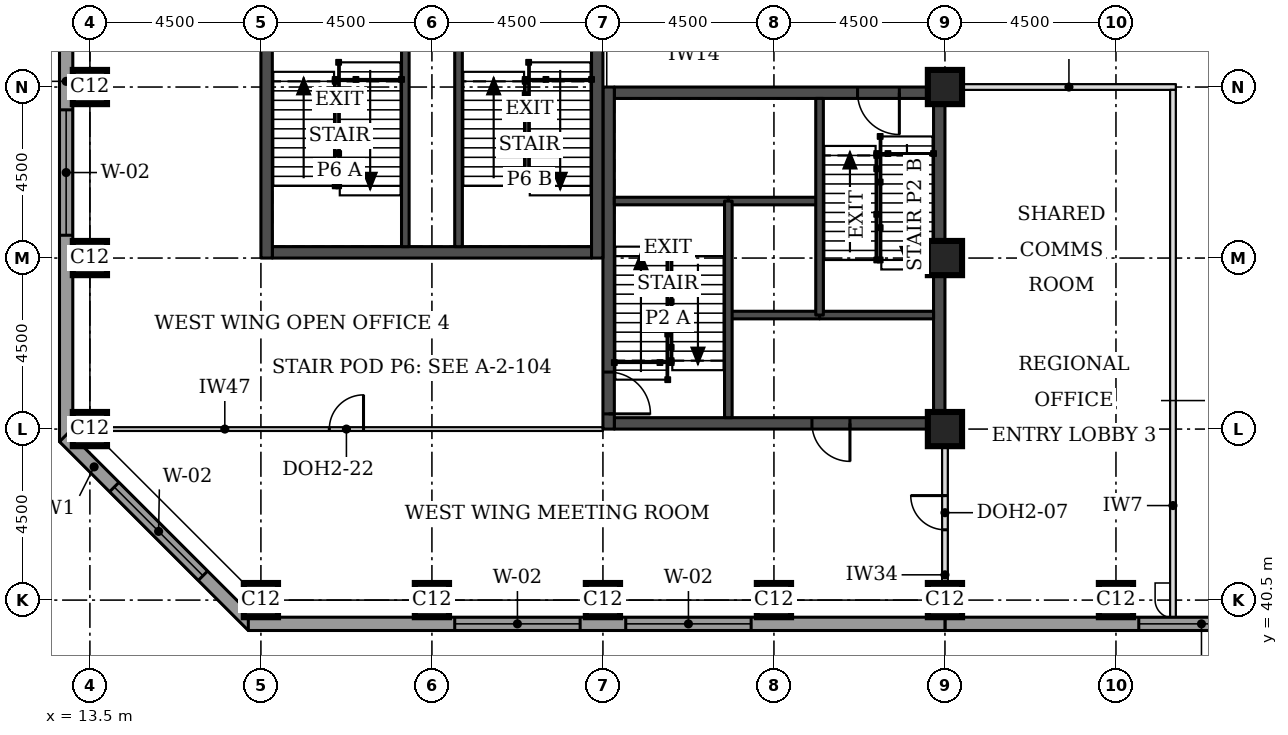
"""IFC4 building model, lengths in metres.
Left out: names, types, materials, properties, quantities, classifications, styles, units other than length and angle.
Written with IfcOpenShell. Run it as: python <this file> out.ifc"""

import sys

from ifc_helpers import new_model, si_unit, direction, frame, frame_2d, origin, origin_2d, place, context, subcontext, project, spatial, rectangle, extrude, element, fill, save


model = new_model("IFC4")
c1 = context("Model", 3, precision=1e-05, world=origin(), true_north=direction((0.0, 1.0)))
c2 = subcontext(c1, "Body", "Model", "MODEL_VIEW")
j1 = project(units=[si_unit("LENGTHUNIT", "METRE"), si_unit("PLANEANGLEUNIT", "RADIAN")], contexts=[c1])
p1 = place(None, origin())
s1 = spatial("IfcSite", under=j1, at=p1, CompositionType="ELEMENT")
p2 = place(p1, origin())
s2 = spatial("IfcBuilding", under=s1, at=p2, CompositionType="ELEMENT")
p3 = place(p2, frame((0.0, 0.0, 155.1)))
s3 = spatial("IfcBuildingStorey", under=s2, at=p3, CompositionType="ELEMENT", Elevation=155.1)
for number, where, z_axis, x_axis in (
    (1, (18.0, 40.5, 0.0), (0.0, 0.0, 1.0), (1.0, 0.0, 0.0)),
    (2, (22.5, 40.5, 0.0), (0.0, 0.0, 1.0), (1.0, 0.0, 0.0)),
    (3, (27.0, 40.5, 0.0), (0.0, 0.0, 1.0), (1.0, 0.0, 0.0)),
    (4, (31.5, 40.5, 0.0), (0.0, 0.0, 1.0), (1.0, 0.0, 0.0)),
    (5, (36.0, 40.5, 0.0), (0.0, 0.0, 1.0), (1.0, 0.0, 0.0)),
    (6, (40.5, 40.5, 0.0), (0.0, 0.0, 1.0), (1.0, 0.0, 0.0)),
    (7, (13.5, 45.0, 0.0), (0.0, 0.0, 1.0), (1.0, 0.0, 0.0)),
    (8, (36.0, 45.0, 0.0), (0.0, 0.0, 1.0), (1.0, 0.0, 0.0)),
    (9, (13.5, 49.5, 0.0), (0.0, 0.0, 1.0), (1.0, 0.0, 0.0)),
    (10, (36.0, 49.5, 0.0), (0.0, 0.0, 1.0), (1.0, 0.0, 0.0)),
    (11, (13.5, 54.0, 0.0), (0.0, 0.0, 1.0), (1.0, 0.0, 0.0)),
    (12, (36.0, 54.0, 0.0), (0.0, 0.0, 1.0), (1.0, 0.0, 0.0)),
):
    element("IfcColumn", number, at=place(p3, frame(where, z_axis=z_axis, x_axis=x_axis)), inside=s3, PredefinedType="COLUMN", context=c2, shape_type="SweptSolid", body=[
        extrude(rectangle(XDim=0.9, YDim=0.9, at=origin_2d()), origin(), (0.0, 0.0, 1.0), 3.7),
    ])
p4 = place(p3, frame((27.3, 45.15, 0.0), z_axis=(0.0, 0.0, 1.0), x_axis=(1.0, 0.0, 0.0)))
e13 = element("IfcWall", 13, at=p4, inside=s3, PredefinedType="SHEAR", context=c2, shape_type="SweptSolid", body=[
    extrude(rectangle(XDim=8.4, YDim=0.3, at=frame_2d((4.2, 0.0))), origin(), (0.0, 0.0, 1.0), 3.7),
])
p5 = place(p4, frame((5.2, 0.0, 0.0)))
e14 = element("IfcOpeningElement", 14, at=p5, cuts=e13, PredefinedType="OPENING", context=c2, shape_type="SweptSolid", body=[
    extrude(rectangle(XDim=1.0, YDim=2.1, at=frame_2d((0.5, 1.05))), frame((0.0, 0.16, 0.0), z_axis=(0.0, -1.0, 0.0), x_axis=(1.0, 0.0, 0.0)), (0.0, 0.0, 1.0), 0.32),
])
p6 = place(p3, frame((27.3, 53.85, 0.0), z_axis=(0.0, 0.0, 1.0), x_axis=(1.0, 0.0, 0.0)))
e15 = element("IfcWall", 15, at=p6, inside=s3, PredefinedType="SHEAR", context=c2, shape_type="SweptSolid", body=[
    extrude(rectangle(XDim=8.4, YDim=0.3, at=frame_2d((4.2, 0.0))), origin(), (0.0, 0.0, 1.0), 3.7),
])
p7 = place(p6, frame((6.4, 0.0, 0.0)))
e16 = element("IfcOpeningElement", 16, at=p7, cuts=e15, PredefinedType="OPENING", context=c2, shape_type="SweptSolid", body=[
    extrude(rectangle(XDim=1.1, YDim=2.1, at=frame_2d((0.55, 1.05))), frame((0.0, 0.16, 0.0), z_axis=(0.0, -1.0, 0.0), x_axis=(1.0, 0.0, 0.0)), (0.0, 0.0, 1.0), 0.32),
])
p8 = place(p3, frame((27.15, 45.0, 0.0), z_axis=(0.0, 0.0, 1.0), x_axis=(0.0, 1.0, 0.0)))
e17 = element("IfcWall", 17, at=p8, inside=s3, PredefinedType="SHEAR", context=c2, shape_type="SweptSolid", body=[
    extrude(rectangle(XDim=9.0, YDim=0.3, at=frame_2d((4.5, 0.0))), origin(), (0.0, 0.0, 1.0), 3.7),
])
p9 = place(p8, frame((0.4, 0.0, 0.0)))
e18 = element("IfcOpeningElement", 18, at=p9, cuts=e17, PredefinedType="OPENING", context=c2, shape_type="SweptSolid", body=[
    extrude(rectangle(XDim=1.1, YDim=2.1, at=frame_2d((0.55, 1.05))), frame((0.0, 0.16, 0.0), z_axis=(0.0, -1.0, 0.0), x_axis=(1.0, 0.0, 0.0)), (0.0, 0.0, 1.0), 0.32),
])
p10 = place(p3, frame((35.85, 45.0, 0.0), z_axis=(0.0, 0.0, 1.0), x_axis=(0.0, 1.0, 0.0)))
e19 = element("IfcWall", 19, at=p10, inside=s3, PredefinedType="SHEAR", context=c2, shape_type="SweptSolid", body=[
    extrude(rectangle(XDim=9.0, YDim=0.3, at=frame_2d((4.5, 0.0))), origin(), (0.0, 0.0, 1.0), 3.7),
])
p11 = place(p3, frame((18.3, 49.65, 0.0), z_axis=(0.0, 0.0, 1.0), x_axis=(1.0, 0.0, 0.0)))
e20 = element("IfcWall", 20, at=p11, inside=s3, PredefinedType="SHEAR", context=c2, shape_type="SweptSolid", body=[
    extrude(rectangle(XDim=8.4, YDim=0.3, at=frame_2d((4.2, 0.0))), origin(), (0.0, 0.0, 1.0), 3.7),
])
p12 = place(p3, frame((18.15, 49.5, 0.0), z_axis=(0.0, 0.0, 1.0), x_axis=(0.0, 1.0, 0.0)))
e21 = element("IfcWall", 21, at=p12, inside=s3, PredefinedType="SHEAR", context=c2, shape_type="SweptSolid", body=[
    extrude(rectangle(XDim=9.0, YDim=0.3, at=frame_2d((4.5, 0.0))), origin(), (0.0, 0.0, 1.0), 3.7),
])
p13 = place(p3, frame((26.85, 49.5, 0.0), z_axis=(0.0, 0.0, 1.0), x_axis=(0.0, 1.0, 0.0)))
e22 = element("IfcWall", 22, at=p13, inside=s3, PredefinedType="SHEAR", context=c2, shape_type="SweptSolid", body=[
    extrude(rectangle(XDim=9.0, YDim=0.3, at=frame_2d((4.5, 0.0))), origin(), (0.0, 0.0, 1.0), 3.7),
])
p14 = place(p13, frame((6.6, 0.0, 0.0)))
e23 = element("IfcOpeningElement", 23, at=p14, cuts=e22, PredefinedType="OPENING", context=c2, shape_type="SweptSolid", body=[
    extrude(rectangle(XDim=1.8, YDim=2.1, at=frame_2d((0.9, 1.05))), frame((0.0, 0.16, 0.0), z_axis=(0.0, -1.0, 0.0), x_axis=(1.0, 0.0, 0.0)), (0.0, 0.0, 1.0), 0.32),
])
p15 = place(p3, frame((36.0, 39.875, 0.0), z_axis=(0.0, 0.0, 1.0), x_axis=(1.0, 0.0, 0.0)))
e24 = element("IfcWall", 24, at=p15, inside=s3, PredefinedType="STANDARD", context=c2, shape_type="SweptSolid", body=[
    extrude(rectangle(XDim=36.331, YDim=0.35, at=frame_2d((18.166, 0.0))), origin(), (0.0, 0.0, 1.0), 3.525),
])
p16 = place(p15, frame((5.1, 0.0, 0.9)))
e25 = element("IfcOpeningElement", 25, at=p16, cuts=e24, PredefinedType="OPENING", context=c2, shape_type="SweptSolid", body=[
    extrude(rectangle(XDim=3.3, YDim=1.9, at=frame_2d((1.65, 0.95))), frame((0.0, 0.185, 0.0), z_axis=(0.0, -1.0, 0.0), x_axis=(1.0, 0.0, 0.0)), (0.0, 0.0, 1.0), 0.37),
])
p17 = place(p15, frame((9.6, 0.0, 0.9)))
e26 = element("IfcOpeningElement", 26, at=p17, cuts=e24, PredefinedType="OPENING", context=c2, shape_type="SweptSolid", body=[
    extrude(rectangle(XDim=3.3, YDim=1.9, at=frame_2d((1.65, 0.95))), frame((0.0, 0.185, 0.0), z_axis=(0.0, -1.0, 0.0), x_axis=(1.0, 0.0, 0.0)), (0.0, 0.0, 1.0), 0.37),
])
p18 = place(p15, frame((14.1, 0.0, 0.9)))
e27 = element("IfcOpeningElement", 27, at=p18, cuts=e24, PredefinedType="OPENING", context=c2, shape_type="SweptSolid", body=[
    extrude(rectangle(XDim=3.3, YDim=1.9, at=frame_2d((1.65, 0.95))), frame((0.0, 0.185, 0.0), z_axis=(0.0, -1.0, 0.0), x_axis=(1.0, 0.0, 0.0)), (0.0, 0.0, 1.0), 0.37),
])
p19 = place(p15, frame((18.6, 0.0, 0.9)))
e28 = element("IfcOpeningElement", 28, at=p19, cuts=e24, PredefinedType="OPENING", context=c2, shape_type="SweptSolid", body=[
    extrude(rectangle(XDim=3.3, YDim=1.9, at=frame_2d((1.65, 0.95))), frame((0.0, 0.185, 0.0), z_axis=(0.0, -1.0, 0.0), x_axis=(1.0, 0.0, 0.0)), (0.0, 0.0, 1.0), 0.37),
])
p20 = place(p15, frame((23.1, 0.0, 0.9)))
e29 = element("IfcOpeningElement", 29, at=p20, cuts=e24, PredefinedType="OPENING", context=c2, shape_type="SweptSolid", body=[
    extrude(rectangle(XDim=3.3, YDim=1.9, at=frame_2d((1.65, 0.95))), frame((0.0, 0.185, 0.0), z_axis=(0.0, -1.0, 0.0), x_axis=(1.0, 0.0, 0.0)), (0.0, 0.0, 1.0), 0.37),
])
p21 = place(p15, frame((27.6, 0.0, 0.9)))
e30 = element("IfcOpeningElement", 30, at=p21, cuts=e24, PredefinedType="OPENING", context=c2, shape_type="SweptSolid", body=[
    extrude(rectangle(XDim=3.3, YDim=1.9, at=frame_2d((1.65, 0.95))), frame((0.0, 0.185, 0.0), z_axis=(0.0, -1.0, 0.0), x_axis=(1.0, 0.0, 0.0)), (0.0, 0.0, 1.0), 0.37),
])
p22 = place(p3, frame((12.875, 58.831, 0.0), z_axis=(0.0, 0.0, 1.0), x_axis=(0.0, -1.0, 0.0)))
e31 = element("IfcWall", 31, at=p22, inside=s3, PredefinedType="STANDARD", context=c2, shape_type="SweptSolid", body=[
    extrude(rectangle(XDim=14.163, YDim=0.35, at=frame_2d((7.081, 0.0))), origin(), (0.0, 0.0, 1.0), 3.525),
])
p23 = place(p22, frame((5.431, 0.0, 0.9)))
e32 = element("IfcOpeningElement", 32, at=p23, cuts=e31, PredefinedType="OPENING", context=c2, shape_type="SweptSolid", body=[
    extrude(rectangle(XDim=3.3, YDim=1.9, at=frame_2d((1.65, 0.95))), frame((0.0, 0.185, 0.0), z_axis=(0.0, -1.0, 0.0), x_axis=(1.0, 0.0, 0.0)), (0.0, 0.0, 1.0), 0.37),
])
p24 = place(p3, frame((12.824, 44.792, 0.0), z_axis=(0.0, 0.0, 1.0), x_axis=(0.707106781187, -0.707106781187, 0.0)))
e33 = element("IfcWall", 33, at=p24, inside=s3, PredefinedType="STANDARD", context=c2, shape_type="SweptSolid", body=[
    extrude(rectangle(XDim=7.027, YDim=0.35, at=frame_2d((3.513, 0.0))), origin(), (0.0, 0.0, 1.0), 3.525),
])
p25 = place(p24, frame((1.863, 0.0, 0.9)))
e34 = element("IfcOpeningElement", 34, at=p25, cuts=e33, PredefinedType="OPENING", context=c2, shape_type="SweptSolid", body=[
    extrude(rectangle(XDim=3.3, YDim=1.9, at=frame_2d((1.65, 0.95))), frame((0.0, 0.185, 0.0), z_axis=(0.0, -1.0, 0.0), x_axis=(1.0, 0.0, 0.0)), (0.0, 0.0, 1.0), 0.37),
])
p26 = place(p3, frame((17.669, 39.875, 0.0), z_axis=(0.0, 0.0, 1.0), x_axis=(1.0, 0.0, 0.0)))
e35 = element("IfcWall", 35, at=p26, inside=s3, PredefinedType="STANDARD", context=c2, shape_type="SweptSolid", body=[
    extrude(rectangle(XDim=18.331, YDim=0.35, at=frame_2d((9.166, 0.0))), origin(), (0.0, 0.0, 1.0), 3.525),
])
p27 = place(p26, frame((5.431, 0.0, 0.9)))
e36 = element("IfcOpeningElement", 36, at=p27, cuts=e35, PredefinedType="OPENING", context=c2, shape_type="SweptSolid", body=[
    extrude(rectangle(XDim=3.3, YDim=1.9, at=frame_2d((1.65, 0.95))), frame((0.0, 0.185, 0.0), z_axis=(0.0, -1.0, 0.0), x_axis=(1.0, 0.0, 0.0)), (0.0, 0.0, 1.0), 0.37),
])
p28 = place(p26, frame((9.931, 0.0, 0.9)))
e37 = element("IfcOpeningElement", 37, at=p28, cuts=e35, PredefinedType="OPENING", context=c2, shape_type="SweptSolid", body=[
    extrude(rectangle(XDim=3.3, YDim=1.9, at=frame_2d((1.65, 0.95))), frame((0.0, 0.185, 0.0), z_axis=(0.0, -1.0, 0.0), x_axis=(1.0, 0.0, 0.0)), (0.0, 0.0, 1.0), 0.37),
])
p29 = place(p3, frame((36.45, 54.0, 0.0), z_axis=(0.0, 0.0, 1.0), x_axis=(1.0, 0.0, 0.0)))
e38 = element("IfcWall", 38, at=p29, inside=s3, PredefinedType="PARTITIONING", context=c2, shape_type="SweptSolid", body=[
    extrude(rectangle(XDim=5.625, YDim=0.15, at=frame_2d((2.812, 0.0))), origin(), (0.0, 0.0, 1.0), 3.55),
])
p30 = place(p3, frame((42.0, 40.05, 0.0), z_axis=(0.0, 0.0, 1.0), x_axis=(0.0, 1.0, 0.0)))
e39 = element("IfcWall", 39, at=p30, inside=s3, PredefinedType="PARTITIONING", context=c2, shape_type="SweptSolid", body=[
    extrude(rectangle(XDim=13.875, YDim=0.15, at=frame_2d((6.938, 0.0))), origin(), (0.0, 0.0, 1.0), 3.55),
])
p31 = place(p3, frame((36.0, 40.95, 0.0), z_axis=(0.0, 0.0, 1.0), x_axis=(0.0, 1.0, 0.0)))
e40 = element("IfcWall", 40, at=p31, inside=s3, PredefinedType="PARTITIONING", context=c2, shape_type="SweptSolid", body=[
    extrude(rectangle(XDim=3.63, YDim=0.15, at=frame_2d((1.815, 0.0))), origin(), (0.0, 0.0, 1.0), 2.8),
])
p32 = place(p31, frame((1.4, 0.0, 0.0)))
e41 = element("IfcOpeningElement", 41, at=p32, cuts=e40, PredefinedType="OPENING", context=c2, shape_type="SweptSolid", body=[
    extrude(rectangle(XDim=0.9, YDim=2.1, at=frame_2d((0.45, 1.05))), frame((0.0, 0.085, 0.0), z_axis=(0.0, -1.0, 0.0), x_axis=(1.0, 0.0, 0.0)), (0.0, 0.0, 1.0), 0.17),
])
p33 = place(p3, frame((13.5, 45.0, 0.0), z_axis=(0.0, 0.0, 1.0), x_axis=(1.0, 0.0, 0.0)))
e42 = element("IfcWall", 42, at=p33, inside=s3, PredefinedType="PARTITIONING", context=c2, shape_type="SweptSolid", body=[
    extrude(rectangle(XDim=13.5, YDim=0.1, at=frame_2d((6.75, 0.0))), origin(), (0.0, 0.0, 1.0), 2.55),
])
p34 = place(p33, frame((6.3, 0.0, 0.0)))
e43 = element("IfcOpeningElement", 43, at=p34, cuts=e42, PredefinedType="OPENING", context=c2, shape_type="SweptSolid", body=[
    extrude(rectangle(XDim=0.9, YDim=2.1, at=frame_2d((0.45, 1.05))), frame((0.0, 0.06, 0.0), z_axis=(0.0, -1.0, 0.0), x_axis=(1.0, 0.0, 0.0)), (0.0, 0.0, 1.0), 0.12),
])
p35 = place(p3, frame((30.3, 48.0, 0.0), z_axis=(0.0, 0.0, 1.0), x_axis=(1.0, 0.0, 0.0)))
e44 = element("IfcWall", 44, at=p35, inside=s3, PredefinedType="SOLIDWALL", context=c2, shape_type="SweptSolid", body=[
    extrude(rectangle(XDim=2.4, YDim=0.2, at=frame_2d((1.2, 0.0))), origin(), (0.0, 0.0, 1.0), 3.55),
])
p36 = place(p3, frame((32.7, 48.0, 0.0), z_axis=(0.0, 0.0, 1.0), x_axis=(1.0, 0.0, 0.0)))
e45 = element("IfcWall", 45, at=p36, inside=s3, PredefinedType="SOLIDWALL", context=c2, shape_type="SweptSolid", body=[
    extrude(rectangle(XDim=3.0, YDim=0.2, at=frame_2d((1.5, 0.0))), origin(), (0.0, 0.0, 1.0), 3.55),
])
p37 = place(p3, frame((30.3, 51.0, 0.0), z_axis=(0.0, 0.0, 1.0), x_axis=(1.0, 0.0, 0.0)))
e46 = element("IfcWall", 46, at=p37, inside=s3, PredefinedType="SOLIDWALL", context=c2, shape_type="SweptSolid", body=[
    extrude(rectangle(XDim=2.4, YDim=0.2, at=frame_2d((1.2, 0.0))), origin(), (0.0, 0.0, 1.0), 3.7),
])
p38 = place(p3, frame((27.3, 51.0, 0.0), z_axis=(0.0, 0.0, 1.0), x_axis=(1.0, 0.0, 0.0)))
e47 = element("IfcWall", 47, at=p38, inside=s3, PredefinedType="SOLIDWALL", context=c2, shape_type="SweptSolid", body=[
    extrude(rectangle(XDim=3.0, YDim=0.2, at=frame_2d((1.5, 0.0))), origin(), (0.0, 0.0, 1.0), 3.55),
])
for number, where, z_axis, x_axis in (
    (48, (30.3, 45.3, 0.0), (0.0, 0.0, 1.0), (0.0, 1.0, 0.0)),
    (49, (32.7, 48.0, 0.0), (0.0, 0.0, 1.0), (0.0, 1.0, 0.0)),
):
    element("IfcWall", number, at=place(p3, frame(where, z_axis=z_axis, x_axis=x_axis)), inside=s3, PredefinedType="SOLIDWALL", context=c2, shape_type="SweptSolid", body=[
        extrude(rectangle(XDim=5.7, YDim=0.2, at=frame_2d((2.85, 0.0))), origin(), (0.0, 0.0, 1.0), 3.55),
    ])
for number, where, z_axis, x_axis in (
    (50, (21.8, 49.8, 0.0), (0.0, 0.0, 1.0), (0.0, 1.0, 0.0)),
    (51, (23.2, 49.8, 0.0), (0.0, 0.0, 1.0), (0.0, 1.0, 0.0)),
):
    element("IfcWall", number, at=place(p3, frame(where, z_axis=z_axis, x_axis=x_axis)), inside=s3, PredefinedType="SOLIDWALL", context=c2, shape_type="SweptSolid", body=[
        extrude(rectangle(XDim=6.05, YDim=0.2, at=frame_2d((3.025, 0.0))), origin(), (0.0, 0.0, 1.0), 3.55),
    ])
p39 = place(p16, origin())
e52 = element("IfcWindow", 52, at=p39, inside=s3, PartitioningType="SINGLE_PANEL", PredefinedType="WINDOW", context=c2, shape_type="SweptSolid", body=[
    extrude(rectangle(XDim=3.3, YDim=1.9, at=frame_2d((1.65, 0.95))), frame((0.0, 0.085, 0.0), z_axis=(0.0, -1.0, 0.0), x_axis=(1.0, 0.0, 0.0)), (0.0, 0.0, 1.0), 0.06),
])
fill(e25, e52)
p40 = place(p23, origin())
e53 = element("IfcWindow", 53, at=p40, inside=s3, PartitioningType="SINGLE_PANEL", PredefinedType="WINDOW", context=c2, shape_type="SweptSolid", body=[
    extrude(rectangle(XDim=3.3, YDim=1.9, at=frame_2d((1.65, 0.95))), frame((0.0, 0.085, 0.0), z_axis=(0.0, -1.0, 0.0), x_axis=(1.0, 0.0, 0.0)), (0.0, 0.0, 1.0), 0.06),
])
fill(e32, e53)
p41 = place(p25, origin())
e54 = element("IfcWindow", 54, at=p41, inside=s3, PartitioningType="SINGLE_PANEL", PredefinedType="WINDOW", context=c2, shape_type="SweptSolid", body=[
    extrude(rectangle(XDim=3.3, YDim=1.9, at=frame_2d((1.65, 0.95))), frame((0.0, 0.085, 0.0), z_axis=(0.0, -1.0, 0.0), x_axis=(1.0, 0.0, 0.0)), (0.0, 0.0, 1.0), 0.06),
])
fill(e34, e54)
p42 = place(p27, origin())
e55 = element("IfcWindow", 55, at=p42, inside=s3, PartitioningType="SINGLE_PANEL", PredefinedType="WINDOW", context=c2, shape_type="SweptSolid", body=[
    extrude(rectangle(XDim=3.3, YDim=1.9, at=frame_2d((1.65, 0.95))), frame((0.0, 0.085, 0.0), z_axis=(0.0, -1.0, 0.0), x_axis=(1.0, 0.0, 0.0)), (0.0, 0.0, 1.0), 0.06),
])
fill(e36, e55)
p43 = place(p28, origin())
e56 = element("IfcWindow", 56, at=p43, inside=s3, PartitioningType="SINGLE_PANEL", PredefinedType="WINDOW", context=c2, shape_type="SweptSolid", body=[
    extrude(rectangle(XDim=3.3, YDim=1.9, at=frame_2d((1.65, 0.95))), frame((0.0, 0.085, 0.0), z_axis=(0.0, -1.0, 0.0), x_axis=(1.0, 0.0, 0.0)), (0.0, 0.0, 1.0), 0.06),
])
fill(e37, e56)
p44 = place(p32, origin())
e57 = element("IfcDoor", 57, at=p44, inside=s3, OperationType="SINGLE_SWING_RIGHT", PredefinedType="DOOR", context=c2, shape_type="SweptSolid", body=[
    extrude(rectangle(XDim=0.9, YDim=2.1, at=frame_2d((0.45, 1.05))), frame((0.0, 0.025, 0.0), z_axis=(0.0, -1.0, 0.0), x_axis=(1.0, 0.0, 0.0)), (0.0, 0.0, 1.0), 0.05),
])
fill(e41, e57)
p45 = place(p34, origin())
e58 = element("IfcDoor", 58, at=p45, inside=s3, OperationType="SINGLE_SWING_RIGHT", PredefinedType="DOOR", context=c2, shape_type="SweptSolid", body=[
    extrude(rectangle(XDim=0.9, YDim=2.1, at=frame_2d((0.45, 1.05))), frame((0.0, 0.025, 0.0), z_axis=(0.0, -1.0, 0.0), x_axis=(1.0, 0.0, 0.0)), (0.0, 0.0, 1.0), 0.05),
])
fill(e43, e58)
p46 = place(p9, frame((1.1, 0.0, 0.0), z_axis=(0.0, 0.0, 1.0), x_axis=(-1.0, 0.0, 0.0)))
e59 = element("IfcDoor", 59, at=p46, inside=s3, OperationType="SINGLE_SWING_RIGHT", PredefinedType="DOOR", context=c2, shape_type="SweptSolid", body=[
    extrude(rectangle(XDim=1.1, YDim=2.1, at=frame_2d((0.55, 1.05))), frame((0.0, 0.025, 0.0), z_axis=(0.0, -1.0, 0.0), x_axis=(1.0, 0.0, 0.0)), (0.0, 0.0, 1.0), 0.05),
])
fill(e18, e59)
p47 = place(p7, frame((1.1, 0.0, 0.0), z_axis=(0.0, 0.0, 1.0), x_axis=(-1.0, 0.0, 0.0)))
e60 = element("IfcDoor", 60, at=p47, inside=s3, OperationType="SINGLE_SWING_LEFT", PredefinedType="DOOR", context=c2, shape_type="SweptSolid", body=[
    extrude(rectangle(XDim=1.1, YDim=2.1, at=frame_2d((0.55, 1.05))), frame((0.0, 0.025, 0.0), z_axis=(0.0, -1.0, 0.0), x_axis=(1.0, 0.0, 0.0)), (0.0, 0.0, 1.0), 0.05),
])
fill(e16, e60)
p48 = place(p5, frame((1.0, 0.0, 0.0), z_axis=(0.0, 0.0, 1.0), x_axis=(-1.0, 0.0, 0.0)))
e61 = element("IfcDoor", 61, at=p48, inside=s3, OperationType="SINGLE_SWING_LEFT", PredefinedType="DOOR", context=c2, shape_type="SweptSolid", body=[
    extrude(rectangle(XDim=1.0, YDim=2.1, at=frame_2d((0.5, 1.05))), frame((0.0, 0.025, 0.0), z_axis=(0.0, -1.0, 0.0), x_axis=(1.0, 0.0, 0.0)), (0.0, 0.0, 1.0), 0.05),
])
fill(e14, e61)
save(model, sys.argv[1])
